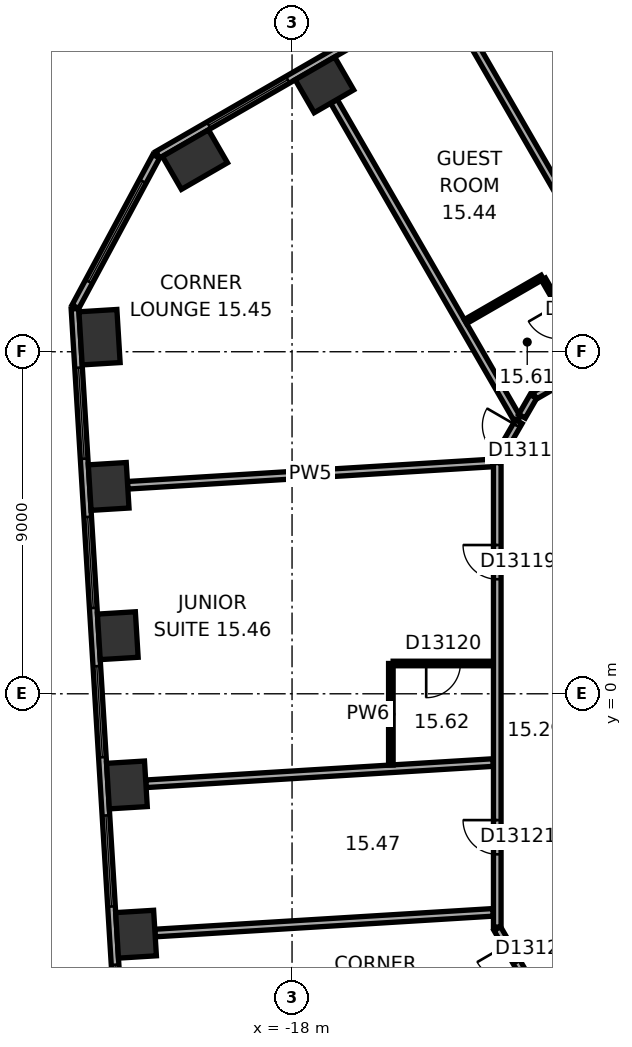
"""IFC4 building model, lengths in metres.
Left out: names, types, materials, properties, quantities, classifications, styles, units other than length and angle.
Written with IfcOpenShell. Run it as: python <this file> out.ifc"""

import sys

from ifc_helpers import new_model, si_unit, direction, frame, frame_2d, origin, origin_2d, place, context, subcontext, project, spatial, rectangle, extrude, element, fill, save


model = new_model("IFC4")
c1 = context("Model", 3, precision=1e-05, world=origin(), true_north=direction((0.0, 1.0)))
c2 = subcontext(c1, "Body", "Model", "MODEL_VIEW")
j1 = project(units=[si_unit("LENGTHUNIT", "METRE"), si_unit("PLANEANGLEUNIT", "RADIAN")], contexts=[c1])
p1 = place(None, origin())
s1 = spatial("IfcSite", under=j1, at=p1, CompositionType="ELEMENT")
p2 = place(p1, origin())
s2 = spatial("IfcBuilding", under=s1, at=p2, CompositionType="ELEMENT")
p3 = place(p2, frame((0.0, 0.0, 70.4)))
s3 = spatial("IfcBuildingStorey", under=s2, at=p3, CompositionType="ELEMENT", Elevation=70.4)
p4 = place(p3, frame((-17.148, 16.023, 0.0), z_axis=(0.0, 0.0, 1.0), x_axis=(-0.866025403784, -0.5, 0.0)))
e1 = element("IfcColumn", 1, at=p4, inside=s3, PredefinedType="COLUMN", context=c2, shape_type="SweptSolid", body=[
    extrude(rectangle(XDim=1.2, YDim=1.0, at=origin_2d()), origin(), (0.0, 0.0, 1.0), 3.3),
])
for number, where, z_axis, x_axis in (
    (2, (-20.555, 14.055, 0.0), (0.0, 0.0, 1.0), (-0.866, -0.5, 0.0)),
    (3, (-23.066, 9.383, 0.0), (0.0, 0.0, 1.0), (0.061, -0.998, 0.0)),
):
    element("IfcColumn", number, at=place(p3, frame(where, z_axis=z_axis, x_axis=x_axis)), inside=s3, PredefinedType="COLUMN", context=c2, shape_type="SweptSolid", body=[
        extrude(rectangle(XDim=1.4, YDim=1.0, at=origin_2d()), origin(), (0.0, 0.0, 1.0), 3.3),
    ])
for number, where, z_axis, x_axis in (
    (4, (-22.826, 5.456, 0.0), (0.0, 0.0, 1.0), (0.061, -0.998, 0.0)),
    (5, (-22.585, 1.529, 0.0), (0.0, 0.0, 1.0), (0.061, -0.998, 0.0)),
    (6, (-22.345, -2.399, 0.0), (0.0, 0.0, 1.0), (0.061, -0.998, 0.0)),
    (7, (-22.105, -6.326, 0.0), (0.0, 0.0, 1.0), (0.061, -0.998, 0.0)),
):
    element("IfcColumn", number, at=place(p3, frame(where, z_axis=z_axis, x_axis=x_axis)), inside=s3, PredefinedType="COLUMN", context=c2, shape_type="SweptSolid", body=[
        extrude(rectangle(XDim=1.2, YDim=1.0, at=origin_2d()), origin(), (0.0, 0.0, 1.0), 3.3),
    ])
p5 = place(p3, frame((-3.136, 24.805, 0.0), z_axis=(0.0, 0.0, 1.0), x_axis=(-0.866028291626, -0.499994998079, 0.0)))
e8 = element("IfcWall", 8, at=p5, inside=s3, PredefinedType="STANDARD", context=c2, shape_type="SweptSolid", body=[
    extrude(rectangle(XDim=21.246, YDim=0.2, at=frame_2d((10.623, 0.0))), origin(), (0.0, 0.0, 1.0), 3.3),
])
p6 = place(p5, frame((1.555, 0.0, 0.8)))
e9 = element("IfcOpeningElement", 9, at=p6, cuts=e8, PredefinedType="OPENING", context=c2, shape_type="SweptSolid", body=[
    extrude(rectangle(XDim=2.4, YDim=1.7, at=frame_2d((1.2, 0.85))), frame((0.0, 0.11, 0.0), z_axis=(0.0, -1.0, 0.0), x_axis=(1.0, 0.0, 0.0)), (0.0, 0.0, 1.0), 0.22),
])
p7 = place(p5, frame((5.489, 0.0, 0.8)))
e10 = element("IfcOpeningElement", 10, at=p7, cuts=e8, PredefinedType="OPENING", context=c2, shape_type="SweptSolid", body=[
    extrude(rectangle(XDim=2.4, YDim=1.7, at=frame_2d((1.2, 0.85))), frame((0.0, 0.11, 0.0), z_axis=(0.0, -1.0, 0.0), x_axis=(1.0, 0.0, 0.0)), (0.0, 0.0, 1.0), 0.22),
])
p8 = place(p5, frame((9.424, 0.0, 0.8)))
e11 = element("IfcOpeningElement", 11, at=p8, cuts=e8, PredefinedType="OPENING", context=c2, shape_type="SweptSolid", body=[
    extrude(rectangle(XDim=2.4, YDim=1.7, at=frame_2d((1.2, 0.85))), frame((0.0, 0.11, 0.0), z_axis=(0.0, -1.0, 0.0), x_axis=(1.0, 0.0, 0.0)), (0.0, 0.0, 1.0), 0.22),
])
p9 = place(p5, frame((13.358, 0.0, 0.8)))
e12 = element("IfcOpeningElement", 12, at=p9, cuts=e8, PredefinedType="OPENING", context=c2, shape_type="SweptSolid", body=[
    extrude(rectangle(XDim=2.4, YDim=1.7, at=frame_2d((1.2, 0.85))), frame((0.0, 0.11, 0.0), z_axis=(0.0, -1.0, 0.0), x_axis=(1.0, 0.0, 0.0)), (0.0, 0.0, 1.0), 0.22),
])
p10 = place(p5, frame((17.293, 0.0, 0.8)))
e13 = element("IfcOpeningElement", 13, at=p10, cuts=e8, PredefinedType="OPENING", context=c2, shape_type="SweptSolid", body=[
    extrude(rectangle(XDim=2.4, YDim=1.7, at=frame_2d((1.2, 0.85))), frame((0.0, 0.11, 0.0), z_axis=(0.0, -1.0, 0.0), x_axis=(1.0, 0.0, 0.0)), (0.0, 0.0, 1.0), 0.22),
])
p11 = place(p3, frame((-21.574, 14.143, 0.0), z_axis=(0.0, 0.0, 1.0), x_axis=(-0.473292949472, -0.880905093628, 0.0)))
e14 = element("IfcWall", 14, at=p11, inside=s3, PredefinedType="STANDARD", context=c2, shape_type="SweptSolid", body=[
    extrude(rectangle(XDim=4.494, YDim=0.2, at=frame_2d((2.247, 0.0))), origin(), (0.0, 0.0, 1.0), 3.3),
])
p12 = place(p11, frame((0.747, 0.0, 0.8)))
e15 = element("IfcOpeningElement", 15, at=p12, cuts=e14, PredefinedType="OPENING", context=c2, shape_type="SweptSolid", body=[
    extrude(rectangle(XDim=3.0, YDim=1.7, at=frame_2d((1.5, 0.85))), frame((0.0, 0.11, 0.0), z_axis=(0.0, -1.0, 0.0), x_axis=(1.0, 0.0, 0.0)), (0.0, 0.0, 1.0), 0.22),
])
p13 = place(p3, frame((-23.713, 10.131, 0.0), z_axis=(0.0, 0.0, 1.0), x_axis=(0.061040439785, -0.998135293791, 0.0)))
e16 = element("IfcWall", 16, at=p13, inside=s3, PredefinedType="STANDARD", context=c2, shape_type="SweptSolid", body=[
    extrude(rectangle(XDim=21.246, YDim=0.2, at=frame_2d((10.623, 0.0))), origin(), (0.0, 0.0, 1.0), 3.3),
])
p14 = place(p13, frame((1.553, 0.0, 0.8)))
e17 = element("IfcOpeningElement", 17, at=p14, cuts=e16, PredefinedType="OPENING", context=c2, shape_type="SweptSolid", body=[
    extrude(rectangle(XDim=2.4, YDim=1.7, at=frame_2d((1.2, 0.85))), frame((0.0, 0.11, 0.0), z_axis=(0.0, -1.0, 0.0), x_axis=(1.0, 0.0, 0.0)), (0.0, 0.0, 1.0), 0.22),
])
p15 = place(p13, frame((5.488, 0.0, 0.8)))
e18 = element("IfcOpeningElement", 18, at=p15, cuts=e16, PredefinedType="OPENING", context=c2, shape_type="SweptSolid", body=[
    extrude(rectangle(XDim=2.4, YDim=1.7, at=frame_2d((1.2, 0.85))), frame((0.0, 0.11, 0.0), z_axis=(0.0, -1.0, 0.0), x_axis=(1.0, 0.0, 0.0)), (0.0, 0.0, 1.0), 0.22),
])
p16 = place(p13, frame((9.422, 0.0, 0.8)))
e19 = element("IfcOpeningElement", 19, at=p16, cuts=e16, PredefinedType="OPENING", context=c2, shape_type="SweptSolid", body=[
    extrude(rectangle(XDim=2.4, YDim=1.7, at=frame_2d((1.2, 0.85))), frame((0.0, 0.11, 0.0), z_axis=(0.0, -1.0, 0.0), x_axis=(1.0, 0.0, 0.0)), (0.0, 0.0, 1.0), 0.22),
])
p17 = place(p13, frame((13.357, 0.0, 0.8)))
e20 = element("IfcOpeningElement", 20, at=p17, cuts=e16, PredefinedType="OPENING", context=c2, shape_type="SweptSolid", body=[
    extrude(rectangle(XDim=2.4, YDim=1.7, at=frame_2d((1.2, 0.85))), frame((0.0, 0.11, 0.0), z_axis=(0.0, -1.0, 0.0), x_axis=(1.0, 0.0, 0.0)), (0.0, 0.0, 1.0), 0.22),
])
p18 = place(p13, frame((17.292, 0.0, 0.8)))
e21 = element("IfcOpeningElement", 21, at=p18, cuts=e16, PredefinedType="OPENING", context=c2, shape_type="SweptSolid", body=[
    extrude(rectangle(XDim=2.4, YDim=1.7, at=frame_2d((1.2, 0.85))), frame((0.0, 0.11, 0.0), z_axis=(0.0, -1.0, 0.0), x_axis=(1.0, 0.0, 0.0)), (0.0, 0.0, 1.0), 0.22),
])
p19 = place(p3, frame((-22.327, 5.486, 0.0), z_axis=(0.0, 0.0, 1.0), x_axis=(0.998135194863, 0.061042057435, 0.0)))
e22 = element("IfcWall", 22, at=p19, inside=s3, PredefinedType="PARTITIONING", context=c2, shape_type="SweptSolid", body=[
    extrude(rectangle(XDim=9.635, YDim=0.2, at=frame_2d((4.817, 0.0))), origin(), (0.0, 0.0, 1.0), 3.05),
])
p20 = place(p3, frame((-21.846, -2.368, 0.0), z_axis=(0.0, 0.0, 1.0), x_axis=(0.998134617584, 0.061051496129, 0.0)))
e23 = element("IfcWall", 23, at=p20, inside=s3, PredefinedType="PARTITIONING", context=c2, shape_type="SweptSolid", body=[
    extrude(rectangle(XDim=9.154, YDim=0.2, at=frame_2d((4.577, 0.0))), origin(), (0.0, 0.0, 1.0), 3.05),
])
p21 = place(p3, frame((-21.606, -6.295, 0.0), z_axis=(0.0, 0.0, 1.0), x_axis=(0.998134305525, 0.061056597794, 0.0)))
e24 = element("IfcWall", 24, at=p21, inside=s3, PredefinedType="PARTITIONING", context=c2, shape_type="SweptSolid", body=[
    extrude(rectangle(XDim=8.913, YDim=0.2, at=frame_2d((4.457, 0.0))), origin(), (0.0, 0.0, 1.0), 2.6),
])
p22 = place(p3, frame((-16.898, 15.59, 0.0), z_axis=(0.0, 0.0, 1.0), x_axis=(0.499994742786, -0.866028439017, 0.0)))
e25 = element("IfcWall", 25, at=p22, inside=s3, PredefinedType="PARTITIONING", context=c2, shape_type="SweptSolid", body=[
    extrude(rectangle(XDim=9.65, YDim=0.2, at=frame_2d((4.825, 0.0))), origin(), (0.0, 0.0, 1.0), 3.05),
])
p23 = place(p3, frame((-15.4, -1.874, 0.0), z_axis=(0.0, 0.0, 1.0), x_axis=(0.0, 1.0, 0.0)))
e26 = element("IfcWall", 26, at=p23, inside=s3, PredefinedType="PARTITIONING", context=c2, shape_type="SweptSolid", body=[
    extrude(rectangle(XDim=2.671, YDim=0.12, at=frame_2d((1.335, 0.0))), origin(), (0.0, 0.0, 1.0), 3.05),
])
p24 = place(p3, frame((-15.34, 0.797, 0.0), z_axis=(0.0, 0.0, 1.0), x_axis=(1.0, 0.0, 0.0)))
e27 = element("IfcWall", 27, at=p24, inside=s3, PredefinedType="PARTITIONING", context=c2, shape_type="SweptSolid", body=[
    extrude(rectangle(XDim=2.64, YDim=0.12, at=frame_2d((1.32, 0.0))), origin(), (0.0, 0.0, 1.0), 2.6),
])
p25 = place(p24, frame((0.87, 0.0, 0.0)))
e28 = element("IfcOpeningElement", 28, at=p25, cuts=e27, PredefinedType="OPENING", context=c2, shape_type="SweptSolid", body=[
    extrude(rectangle(XDim=0.9, YDim=2.1, at=frame_2d((0.45, 1.05))), frame((0.0, 0.07, 0.0), z_axis=(0.0, -1.0, 0.0), x_axis=(1.0, 0.0, 0.0)), (0.0, 0.0, 1.0), 0.14),
])
p26 = place(p3, frame((-13.436, 9.794, 0.0), z_axis=(0.0, 0.0, 1.0), x_axis=(0.866053246676, 0.499951771596, 0.0)))
e29 = element("IfcWall", 29, at=p26, inside=s3, PredefinedType="PARTITIONING", context=c2, shape_type="SweptSolid", body=[
    extrude(rectangle(XDim=2.335, YDim=0.12, at=frame_2d((1.167, 0.0))), origin(), (0.0, 0.0, 1.0), 3.05),
])
p27 = place(p3, frame((-12.6, -6.177, 0.0), z_axis=(0.0, 0.0, 1.0), x_axis=(0.500063520245, -0.865988727248, 0.0)))
e30 = element("IfcWall", 30, at=p27, inside=s3, PredefinedType="PARTITIONING", context=c2, shape_type="SweptSolid", body=[
    extrude(rectangle(XDim=1.9, YDim=0.2, at=frame_2d((0.95, 0.0))), origin(), (0.0, 0.0, 1.0), 3.05),
])
p28 = place(p27, frame((0.5, 0.0, 0.0)))
e31 = element("IfcOpeningElement", 31, at=p28, cuts=e30, PredefinedType="OPENING", context=c2, shape_type="SweptSolid", body=[
    extrude(rectangle(XDim=0.9, YDim=2.1, at=frame_2d((0.45, 1.05))), frame((0.0, 0.11, 0.0), z_axis=(0.0, -1.0, 0.0), x_axis=(1.0, 0.0, 0.0)), (0.0, 0.0, 1.0), 0.22),
])
p29 = place(p3, frame((-12.6, 6.081, 0.0), z_axis=(0.0, 0.0, 1.0), x_axis=(0.0, -1.0, 0.0)))
e32 = element("IfcWall", 32, at=p29, inside=s3, PredefinedType="PARTITIONING", context=c2, shape_type="SweptSolid", body=[
    extrude(rectangle(XDim=12.219, YDim=0.2, at=frame_2d((6.109, 0.0))), origin(), (0.0, 0.0, 1.0), 3.05),
])
p30 = place(p29, frame((2.167, 0.0, 0.0)))
e33 = element("IfcOpeningElement", 33, at=p30, cuts=e32, PredefinedType="OPENING", context=c2, shape_type="SweptSolid", body=[
    extrude(rectangle(XDim=0.9, YDim=2.1, at=frame_2d((0.45, 1.05))), frame((0.0, 0.11, 0.0), z_axis=(0.0, -1.0, 0.0), x_axis=(1.0, 0.0, 0.0)), (0.0, 0.0, 1.0), 0.22),
])
p31 = place(p29, frame((9.405, 0.0, 0.0)))
e34 = element("IfcOpeningElement", 34, at=p31, cuts=e32, PredefinedType="OPENING", context=c2, shape_type="SweptSolid", body=[
    extrude(rectangle(XDim=0.9, YDim=2.1, at=frame_2d((0.45, 1.05))), frame((0.0, 0.11, 0.0), z_axis=(0.0, -1.0, 0.0), x_axis=(1.0, 0.0, 0.0)), (0.0, 0.0, 1.0), 0.22),
])
p32 = place(p3, frame((-12.032, 7.162, 0.0), z_axis=(0.0, 0.0, 1.0), x_axis=(-0.499951829968, -0.866053212979, 0.0)))
e35 = element("IfcWall", 35, at=p32, inside=s3, PredefinedType="PARTITIONING", context=c2, shape_type="SweptSolid", body=[
    extrude(rectangle(XDim=1.136, YDim=0.2, at=frame_2d((0.568, 0.0))), origin(), (0.0, 0.0, 1.0), 3.05),
])
p33 = place(p32, frame((0.118, 0.0, 0.0)))
e36 = element("IfcOpeningElement", 36, at=p33, cuts=e35, PredefinedType="OPENING", context=c2, shape_type="SweptSolid", body=[
    extrude(rectangle(XDim=0.9, YDim=2.1, at=frame_2d((0.45, 1.05))), frame((0.0, 0.11, 0.0), z_axis=(0.0, -1.0, 0.0), x_axis=(1.0, 0.0, 0.0)), (0.0, 0.0, 1.0), 0.22),
])
p34 = place(p3, frame((-11.65, 7.823, 0.0), z_axis=(0.0, 0.0, 1.0), x_axis=(-0.50012165622, -0.865955154139, 0.0)))
e37 = element("IfcWall", 37, at=p34, inside=s3, PredefinedType="PARTITIONING", context=c2, shape_type="SweptSolid", body=[
    extrude(rectangle(XDim=0.6, YDim=0.2, at=frame_2d((0.3, 0.0))), origin(), (0.0, 0.0, 1.0), 3.05),
])
p35 = place(p3, frame((-11.385, 10.909, 0.0), z_axis=(0.0, 0.0, 1.0), x_axis=(0.500077547548, -0.865980627057, 0.0)))
e38 = element("IfcWall", 38, at=p35, inside=s3, PredefinedType="PARTITIONING", context=c2, shape_type="SweptSolid", body=[
    extrude(rectangle(XDim=2.44, YDim=0.12, at=frame_2d((1.22, 0.0))), origin(), (0.0, 0.0, 1.0), 3.05),
])
p36 = place(p35, frame((0.77, 0.0, 0.0)))
e39 = element("IfcOpeningElement", 39, at=p36, cuts=e38, PredefinedType="OPENING", context=c2, shape_type="SweptSolid", body=[
    extrude(rectangle(XDim=0.9, YDim=2.1, at=frame_2d((0.45, 1.05))), frame((0.0, 0.07, 0.0), z_axis=(0.0, -1.0, 0.0), x_axis=(1.0, 0.0, 0.0)), (0.0, 0.0, 1.0), 0.14),
])
p37 = place(p3, frame((-8.902, 9.41, 0.0), z_axis=(0.0, 0.0, 1.0), x_axis=(-0.866014299198, -0.500019233215, 0.0)))
e40 = element("IfcWall", 40, at=p37, inside=s3, PredefinedType="PARTITIONING", context=c2, shape_type="SweptSolid", body=[
    extrude(rectangle(XDim=3.133, YDim=0.2, at=frame_2d((1.567, 0.0))), origin(), (0.0, 0.0, 1.0), 3.05),
])
p38 = place(p37, frame((0.225, 0.0, 0.0)))
e41 = element("IfcOpeningElement", 41, at=p38, cuts=e40, PredefinedType="OPENING", context=c2, shape_type="SweptSolid", body=[
    extrude(rectangle(XDim=0.9, YDim=2.1, at=frame_2d((0.45, 1.05))), frame((0.0, 0.11, 0.0), z_axis=(0.0, -1.0, 0.0), x_axis=(1.0, 0.0, 0.0)), (0.0, 0.0, 1.0), 0.22),
])
p39 = place(p3, frame((-7.865, 7.814, 0.0), z_axis=(0.0, 0.0, 1.0), x_axis=(-0.500004234368, 0.866022959057, 0.0)))
e42 = element("IfcWall", 42, at=p39, inside=s3, PredefinedType="PARTITIONING", context=c2, shape_type="SweptSolid", body=[
    extrude(rectangle(XDim=11.25, YDim=0.2, at=frame_2d((5.625, 0.0))), origin(), (0.0, 0.0, 1.0), 3.05),
])
p40 = place(p39, frame((0.5, 0.0, 0.0)))
e43 = element("IfcOpeningElement", 43, at=p40, cuts=e42, PredefinedType="OPENING", context=c2, shape_type="SweptSolid", body=[
    extrude(rectangle(XDim=0.9, YDim=2.1, at=frame_2d((0.45, 1.05))), frame((0.0, 0.11, 0.0), z_axis=(0.0, -1.0, 0.0), x_axis=(1.0, 0.0, 0.0)), (0.0, 0.0, 1.0), 0.22),
])
p41 = place(p10, origin())
e44 = element("IfcWindow", 44, at=p41, inside=s3, PartitioningType="SINGLE_PANEL", PredefinedType="WINDOW", context=c2, shape_type="SweptSolid", body=[
    extrude(rectangle(XDim=2.4, YDim=1.7, at=frame_2d((1.2, 0.85))), frame((0.0, 0.03, 0.0), z_axis=(0.0, -1.0, 0.0), x_axis=(1.0, 0.0, 0.0)), (0.0, 0.0, 1.0), 0.06),
])
fill(e13, e44)
p42 = place(p12, origin())
e45 = element("IfcWindow", 45, at=p42, inside=s3, PartitioningType="SINGLE_PANEL", PredefinedType="WINDOW", context=c2, shape_type="SweptSolid", body=[
    extrude(rectangle(XDim=3.0, YDim=1.7, at=frame_2d((1.5, 0.85))), frame((0.0, 0.03, 0.0), z_axis=(0.0, -1.0, 0.0), x_axis=(1.0, 0.0, 0.0)), (0.0, 0.0, 1.0), 0.06),
])
fill(e15, e45)
p43 = place(p14, origin())
e46 = element("IfcWindow", 46, at=p43, inside=s3, PartitioningType="SINGLE_PANEL", PredefinedType="WINDOW", context=c2, shape_type="SweptSolid", body=[
    extrude(rectangle(XDim=2.4, YDim=1.7, at=frame_2d((1.2, 0.85))), frame((0.0, 0.03, 0.0), z_axis=(0.0, -1.0, 0.0), x_axis=(1.0, 0.0, 0.0)), (0.0, 0.0, 1.0), 0.06),
])
fill(e17, e46)
p44 = place(p15, origin())
e47 = element("IfcWindow", 47, at=p44, inside=s3, PartitioningType="SINGLE_PANEL", PredefinedType="WINDOW", context=c2, shape_type="SweptSolid", body=[
    extrude(rectangle(XDim=2.4, YDim=1.7, at=frame_2d((1.2, 0.85))), frame((0.0, 0.03, 0.0), z_axis=(0.0, -1.0, 0.0), x_axis=(1.0, 0.0, 0.0)), (0.0, 0.0, 1.0), 0.06),
])
fill(e18, e47)
p45 = place(p16, origin())
e48 = element("IfcWindow", 48, at=p45, inside=s3, PartitioningType="SINGLE_PANEL", PredefinedType="WINDOW", context=c2, shape_type="SweptSolid", body=[
    extrude(rectangle(XDim=2.4, YDim=1.7, at=frame_2d((1.2, 0.85))), frame((0.0, 0.03, 0.0), z_axis=(0.0, -1.0, 0.0), x_axis=(1.0, 0.0, 0.0)), (0.0, 0.0, 1.0), 0.06),
])
fill(e19, e48)
p46 = place(p17, origin())
e49 = element("IfcWindow", 49, at=p46, inside=s3, PartitioningType="SINGLE_PANEL", PredefinedType="WINDOW", context=c2, shape_type="SweptSolid", body=[
    extrude(rectangle(XDim=2.4, YDim=1.7, at=frame_2d((1.2, 0.85))), frame((0.0, 0.03, 0.0), z_axis=(0.0, -1.0, 0.0), x_axis=(1.0, 0.0, 0.0)), (0.0, 0.0, 1.0), 0.06),
])
fill(e20, e49)
p47 = place(p18, origin())
e50 = element("IfcWindow", 50, at=p47, inside=s3, PartitioningType="SINGLE_PANEL", PredefinedType="WINDOW", context=c2, shape_type="SweptSolid", body=[
    extrude(rectangle(XDim=2.4, YDim=1.7, at=frame_2d((1.2, 0.85))), frame((0.0, 0.03, 0.0), z_axis=(0.0, -1.0, 0.0), x_axis=(1.0, 0.0, 0.0)), (0.0, 0.0, 1.0), 0.06),
])
fill(e21, e50)
p48 = place(p33, origin())
e51 = element("IfcDoor", 51, at=p48, inside=s3, OperationType="SINGLE_SWING_LEFT", PredefinedType="DOOR", context=c2, shape_type="SweptSolid", body=[
    extrude(rectangle(XDim=0.9, YDim=2.1, at=frame_2d((0.45, 1.05))), frame((0.0, 0.025, 0.0), z_axis=(0.0, -1.0, 0.0), x_axis=(1.0, 0.0, 0.0)), (0.0, 0.0, 1.0), 0.05),
])
fill(e36, e51)
p49 = place(p30, origin())
e52 = element("IfcDoor", 52, at=p49, inside=s3, OperationType="SINGLE_SWING_LEFT", PredefinedType="DOOR", context=c2, shape_type="SweptSolid", body=[
    extrude(rectangle(XDim=0.9, YDim=2.1, at=frame_2d((0.45, 1.05))), frame((0.0, 0.025, 0.0), z_axis=(0.0, -1.0, 0.0), x_axis=(1.0, 0.0, 0.0)), (0.0, 0.0, 1.0), 0.05),
])
fill(e33, e52)
p50 = place(p25, origin())
e53 = element("IfcDoor", 53, at=p50, inside=s3, OperationType="SINGLE_SWING_LEFT", PredefinedType="DOOR", context=c2, shape_type="SweptSolid", body=[
    extrude(rectangle(XDim=0.9, YDim=2.1, at=frame_2d((0.45, 1.05))), frame((0.0, 0.025, 0.0), z_axis=(0.0, -1.0, 0.0), x_axis=(1.0, 0.0, 0.0)), (0.0, 0.0, 1.0), 0.05),
])
fill(e28, e53)
p51 = place(p31, origin())
e54 = element("IfcDoor", 54, at=p51, inside=s3, OperationType="SINGLE_SWING_LEFT", PredefinedType="DOOR", context=c2, shape_type="SweptSolid", body=[
    extrude(rectangle(XDim=0.9, YDim=2.1, at=frame_2d((0.45, 1.05))), frame((0.0, 0.025, 0.0), z_axis=(0.0, -1.0, 0.0), x_axis=(1.0, 0.0, 0.0)), (0.0, 0.0, 1.0), 0.05),
])
fill(e34, e54)
p52 = place(p28, origin())
e55 = element("IfcDoor", 55, at=p52, inside=s3, OperationType="SINGLE_SWING_LEFT", PredefinedType="DOOR", context=c2, shape_type="SweptSolid", body=[
    extrude(rectangle(XDim=0.9, YDim=2.1, at=frame_2d((0.45, 1.05))), frame((0.0, 0.025, 0.0), z_axis=(0.0, -1.0, 0.0), x_axis=(1.0, 0.0, 0.0)), (0.0, 0.0, 1.0), 0.05),
])
fill(e31, e55)
save(model, sys.argv[1])
